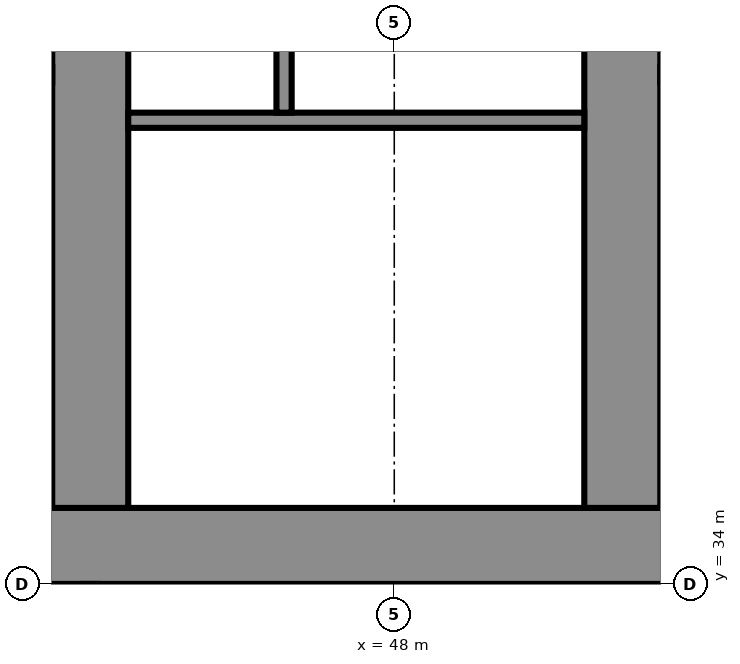
"""IFC4 building model, lengths in metres.
Left out: names, types, materials, properties, quantities, classifications, styles, units other than length and angle.
Written with IfcOpenShell. Run it as: python <this file> out.ifc"""

import sys

from ifc_helpers import new_model, si_unit, direction, frame, frame_2d, origin, place, context, subcontext, project, spatial, rectangle, extrude, element, fill, save


model = new_model("IFC4")
c1 = context("Model", 3, precision=1e-05, world=origin(), true_north=direction((0.0, 1.0)))
c2 = subcontext(c1, "Body", "Model", "MODEL_VIEW")
j1 = project(units=[si_unit("LENGTHUNIT", "METRE"), si_unit("PLANEANGLEUNIT", "RADIAN")], contexts=[c1])
p1 = place(None, origin())
s1 = spatial("IfcSite", under=j1, at=p1, CompositionType="ELEMENT")
p2 = place(p1, origin())
s2 = spatial("IfcBuilding", under=s1, at=p2, CompositionType="ELEMENT")
p3 = place(p2, frame((0.0, 0.0, 96.7)))
s3 = spatial("IfcBuildingStorey", under=s2, at=p3, CompositionType="ELEMENT", Elevation=96.7)
p4 = place(p3, frame((16.0, 34.5, 0.0), z_axis=(0.0, 0.0, 1.0), x_axis=(1.0, 0.0, 0.0)))
e1 = element("IfcWall", 1, at=p4, inside=s3, PredefinedType="SHEAR", context=c2, shape_type="SweptSolid", body=[
    extrude(rectangle(XDim=49.0, YDim=1.0, at=frame_2d((24.5, 0.0))), origin(), (0.0, 0.0, 1.0), 3.6),
])
p5 = place(p4, frame((1.2, 0.0, 0.0)))
e2 = element("IfcOpeningElement", 2, at=p5, cuts=e1, PredefinedType="OPENING", context=c2, shape_type="SweptSolid", body=[
    extrude(rectangle(XDim=1.1, YDim=2.1, at=frame_2d((0.55, 1.05))), frame((0.0, 0.51, 0.0), z_axis=(0.0, -1.0, 0.0), x_axis=(1.0, 0.0, 0.0)), (0.0, 0.0, 1.0), 1.02),
])
p6 = place(p4, frame((5.083, 0.0, 0.0)))
e3 = element("IfcOpeningElement", 3, at=p6, cuts=e1, PredefinedType="OPENING", context=c2, shape_type="SweptSolid", body=[
    extrude(rectangle(XDim=1.1, YDim=2.1, at=frame_2d((0.55, 1.05))), frame((0.0, 0.51, 0.0), z_axis=(0.0, -1.0, 0.0), x_axis=(1.0, 0.0, 0.0)), (0.0, 0.0, 1.0), 1.02),
])
p7 = place(p4, frame((2.933, 0.0, 0.0)))
e4 = element("IfcOpeningElement", 4, at=p7, cuts=e1, PredefinedType="OPENING", context=c2, shape_type="SweptSolid", body=[
    extrude(rectangle(XDim=1.4, YDim=2.1, at=frame_2d((0.7, 1.05))), frame((0.0, 0.51, 0.0), z_axis=(0.0, -1.0, 0.0), x_axis=(1.0, 0.0, 0.0)), (0.0, 0.0, 1.0), 1.02),
])
p8 = place(p4, frame((7.65, 0.0, 0.0)))
e5 = element("IfcOpeningElement", 5, at=p8, cuts=e1, PredefinedType="OPENING", context=c2, shape_type="SweptSolid", body=[
    extrude(rectangle(XDim=1.2, YDim=2.1, at=frame_2d((0.6, 1.05))), frame((0.0, 0.51, 0.0), z_axis=(0.0, -1.0, 0.0), x_axis=(1.0, 0.0, 0.0)), (0.0, 0.0, 1.0), 1.02),
])
p9 = place(p4, frame((14.817, 0.0, 0.0)))
e6 = element("IfcOpeningElement", 6, at=p9, cuts=e1, PredefinedType="OPENING", context=c2, shape_type="SweptSolid", body=[
    extrude(rectangle(XDim=1.1, YDim=2.1, at=frame_2d((0.55, 1.05))), frame((0.0, 0.51, 0.0), z_axis=(0.0, -1.0, 0.0), x_axis=(1.0, 0.0, 0.0)), (0.0, 0.0, 1.0), 1.02),
])
p10 = place(p4, frame((19.083, 0.0, 0.0)))
e7 = element("IfcOpeningElement", 7, at=p10, cuts=e1, PredefinedType="OPENING", context=c2, shape_type="SweptSolid", body=[
    extrude(rectangle(XDim=1.1, YDim=2.1, at=frame_2d((0.55, 1.05))), frame((0.0, 0.51, 0.0), z_axis=(0.0, -1.0, 0.0), x_axis=(1.0, 0.0, 0.0)), (0.0, 0.0, 1.0), 1.02),
])
p11 = place(p4, frame((16.8, 0.0, 0.0)))
e8 = element("IfcOpeningElement", 8, at=p11, cuts=e1, PredefinedType="OPENING", context=c2, shape_type="SweptSolid", body=[
    extrude(rectangle(XDim=1.4, YDim=2.1, at=frame_2d((0.7, 1.05))), frame((0.0, 0.51, 0.0), z_axis=(0.0, -1.0, 0.0), x_axis=(1.0, 0.0, 0.0)), (0.0, 0.0, 1.0), 1.02),
])
p12 = place(p4, frame((21.817, 0.0, 0.0)))
e9 = element("IfcOpeningElement", 9, at=p12, cuts=e1, PredefinedType="OPENING", context=c2, shape_type="SweptSolid", body=[
    extrude(rectangle(XDim=1.1, YDim=2.1, at=frame_2d((0.55, 1.05))), frame((0.0, 0.51, 0.0), z_axis=(0.0, -1.0, 0.0), x_axis=(1.0, 0.0, 0.0)), (0.0, 0.0, 1.0), 1.02),
])
p13 = place(p4, frame((26.083, 0.0, 0.0)))
e10 = element("IfcOpeningElement", 10, at=p13, cuts=e1, PredefinedType="OPENING", context=c2, shape_type="SweptSolid", body=[
    extrude(rectangle(XDim=1.1, YDim=2.1, at=frame_2d((0.55, 1.05))), frame((0.0, 0.51, 0.0), z_axis=(0.0, -1.0, 0.0), x_axis=(1.0, 0.0, 0.0)), (0.0, 0.0, 1.0), 1.02),
])
p14 = place(p4, frame((33.15, 0.0, 0.0)))
e11 = element("IfcOpeningElement", 11, at=p14, cuts=e1, PredefinedType="OPENING", context=c2, shape_type="SweptSolid", body=[
    extrude(rectangle(XDim=1.2, YDim=2.1, at=frame_2d((0.6, 1.05))), frame((0.0, 0.51, 0.0), z_axis=(0.0, -1.0, 0.0), x_axis=(1.0, 0.0, 0.0)), (0.0, 0.0, 1.0), 1.02),
])
p15 = place(p4, frame((37.8, 0.0, 0.0)))
e12 = element("IfcOpeningElement", 12, at=p15, cuts=e1, PredefinedType="OPENING", context=c2, shape_type="SweptSolid", body=[
    extrude(rectangle(XDim=1.4, YDim=2.1, at=frame_2d((0.7, 1.05))), frame((0.0, 0.51, 0.0), z_axis=(0.0, -1.0, 0.0), x_axis=(1.0, 0.0, 0.0)), (0.0, 0.0, 1.0), 1.02),
])
p16 = place(p4, frame((42.817, 0.0, 0.0)))
e13 = element("IfcOpeningElement", 13, at=p16, cuts=e1, PredefinedType="OPENING", context=c2, shape_type="SweptSolid", body=[
    extrude(rectangle(XDim=1.1, YDim=2.1, at=frame_2d((0.55, 1.05))), frame((0.0, 0.51, 0.0), z_axis=(0.0, -1.0, 0.0), x_axis=(1.0, 0.0, 0.0)), (0.0, 0.0, 1.0), 1.02),
])
p17 = place(p4, frame((46.7, 0.0, 0.0)))
e14 = element("IfcOpeningElement", 14, at=p17, cuts=e1, PredefinedType="OPENING", context=c2, shape_type="SweptSolid", body=[
    extrude(rectangle(XDim=1.1, YDim=2.1, at=frame_2d((0.55, 1.05))), frame((0.0, 0.51, 0.0), z_axis=(0.0, -1.0, 0.0), x_axis=(1.0, 0.0, 0.0)), (0.0, 0.0, 1.0), 1.02),
])
p18 = place(p4, frame((44.667, 0.0, 0.0)))
e15 = element("IfcOpeningElement", 15, at=p18, cuts=e1, PredefinedType="OPENING", context=c2, shape_type="SweptSolid", body=[
    extrude(rectangle(XDim=1.4, YDim=2.1, at=frame_2d((0.7, 1.05))), frame((0.0, 0.51, 0.0), z_axis=(0.0, -1.0, 0.0), x_axis=(1.0, 0.0, 0.0)), (0.0, 0.0, 1.0), 1.02),
])
p19 = place(p3, frame((44.0, 35.0, 0.0), z_axis=(0.0, 0.0, 1.0), x_axis=(0.0, 1.0, 0.0)))
e16 = element("IfcWall", 16, at=p19, inside=s3, PredefinedType="SHEAR", context=c2, shape_type="SweptSolid", body=[
    extrude(rectangle(XDim=14.577, YDim=1.0, at=frame_2d((7.289, 0.0))), origin(), (0.0, 0.0, 1.0), 3.6),
])
p20 = place(p19, frame((3.4, 0.0, 0.0)))
e17 = element("IfcOpeningElement", 17, at=p20, cuts=e16, PredefinedType="OPENING", context=c2, shape_type="SweptSolid", body=[
    extrude(rectangle(XDim=1.1, YDim=2.1, at=frame_2d((0.55, 1.05))), frame((0.0, 0.51, 0.0), z_axis=(0.0, -1.0, 0.0), x_axis=(1.0, 0.0, 0.0)), (0.0, 0.0, 1.0), 1.02),
])
p21 = place(p19, frame((9.8, 0.0, 0.0)))
e18 = element("IfcOpeningElement", 18, at=p21, cuts=e16, PredefinedType="OPENING", context=c2, shape_type="SweptSolid", body=[
    extrude(rectangle(XDim=1.0, YDim=2.1, at=frame_2d((0.5, 1.05))), frame((0.0, 0.51, 0.0), z_axis=(0.0, -1.0, 0.0), x_axis=(1.0, 0.0, 0.0)), (0.0, 0.0, 1.0), 1.02),
])
p22 = place(p3, frame((51.0, 35.0, 0.0), z_axis=(0.0, 0.0, 1.0), x_axis=(0.0, 1.0, 0.0)))
e19 = element("IfcWall", 19, at=p22, inside=s3, PredefinedType="SHEAR", context=c2, shape_type="SweptSolid", body=[
    extrude(rectangle(XDim=13.965, YDim=1.0, at=frame_2d((6.982, 0.0))), origin(), (0.0, 0.0, 1.0), 3.6),
])
p23 = place(p22, frame((3.4, 0.0, 0.0)))
e20 = element("IfcOpeningElement", 20, at=p23, cuts=e19, PredefinedType="OPENING", context=c2, shape_type="SweptSolid", body=[
    extrude(rectangle(XDim=1.1, YDim=2.1, at=frame_2d((0.55, 1.05))), frame((0.0, 0.51, 0.0), z_axis=(0.0, -1.0, 0.0), x_axis=(1.0, 0.0, 0.0)), (0.0, 0.0, 1.0), 1.02),
])
p24 = place(p3, frame((44.5, 40.1, 0.0), z_axis=(0.0, 0.0, 1.0), x_axis=(1.0, 0.0, 0.0)))
e21 = element("IfcWall", 21, at=p24, inside=s3, PredefinedType="SHEAR", context=c2, shape_type="SweptSolid", body=[
    extrude(rectangle(XDim=6.0, YDim=0.2, at=frame_2d((3.0, 0.0))), origin(), (0.0, 0.0, 1.0), 3.2),
])
p25 = place(p24, frame((3.425, 0.0, 0.0)))
e22 = element("IfcOpeningElement", 22, at=p25, cuts=e21, PredefinedType="OPENING", context=c2, shape_type="SweptSolid", body=[
    extrude(rectangle(XDim=1.2, YDim=2.1, at=frame_2d((0.6, 1.05))), frame((0.0, 0.11, 0.0), z_axis=(0.0, -1.0, 0.0), x_axis=(1.0, 0.0, 0.0)), (0.0, 0.0, 1.0), 0.22),
])
p26 = place(p24, frame((0.525, 0.0, 0.0)))
e23 = element("IfcOpeningElement", 23, at=p26, cuts=e21, PredefinedType="OPENING", context=c2, shape_type="SweptSolid", body=[
    extrude(rectangle(XDim=0.9, YDim=2.1, at=frame_2d((0.45, 1.05))), frame((0.0, 0.11, 0.0), z_axis=(0.0, -1.0, 0.0), x_axis=(1.0, 0.0, 0.0)), (0.0, 0.0, 1.0), 0.22),
])
p27 = place(p3, frame((46.55, 40.2, 0.0), z_axis=(0.0, 0.0, 1.0), x_axis=(0.0, 1.0, 0.0)))
e24 = element("IfcWall", 24, at=p27, inside=s3, PredefinedType="SHEAR", context=c2, shape_type="SweptSolid", body=[
    extrude(rectangle(XDim=7.2, YDim=0.2, at=frame_2d((3.6, 0.0))), origin(), (0.0, 0.0, 1.0), 3.2),
])
p28 = place(p25, origin())
e25 = element("IfcDoor", 25, at=p28, inside=s3, OperationType="SINGLE_SWING_RIGHT", PredefinedType="DOOR", context=c2, shape_type="SweptSolid", body=[
    extrude(rectangle(XDim=1.2, YDim=2.1, at=frame_2d((0.6, 1.05))), frame((0.0, 0.025, 0.0), z_axis=(0.0, -1.0, 0.0), x_axis=(1.0, 0.0, 0.0)), (0.0, 0.0, 1.0), 0.05),
])
fill(e22, e25)
p29 = place(p26, origin())
e26 = element("IfcDoor", 26, at=p29, inside=s3, OperationType="SINGLE_SWING_LEFT", PredefinedType="DOOR", context=c2, shape_type="SweptSolid", body=[
    extrude(rectangle(XDim=0.9, YDim=2.1, at=frame_2d((0.45, 1.05))), frame((0.0, 0.025, 0.0), z_axis=(0.0, -1.0, 0.0), x_axis=(1.0, 0.0, 0.0)), (0.0, 0.0, 1.0), 0.05),
])
fill(e23, e26)
p30 = place(p14, origin())
e27 = element("IfcDoor", 27, at=p30, inside=s3, OperationType="SINGLE_SWING_LEFT", PredefinedType="DOOR", context=c2, shape_type="SweptSolid", body=[
    extrude(rectangle(XDim=1.2, YDim=2.1, at=frame_2d((0.6, 1.05))), frame((0.0, 0.025, 0.0), z_axis=(0.0, -1.0, 0.0), x_axis=(1.0, 0.0, 0.0)), (0.0, 0.0, 1.0), 0.05),
])
fill(e11, e27)
p31 = place(p20, origin())
e28 = element("IfcDoor", 28, at=p31, inside=s3, OperationType="SINGLE_SWING_LEFT", PredefinedType="DOOR", context=c2, shape_type="SweptSolid", body=[
    extrude(rectangle(XDim=1.1, YDim=2.1, at=frame_2d((0.55, 1.05))), frame((0.0, 0.025, 0.0), z_axis=(0.0, -1.0, 0.0), x_axis=(1.0, 0.0, 0.0)), (0.0, 0.0, 1.0), 0.05),
])
fill(e17, e28)
p32 = place(p23, origin())
e29 = element("IfcDoor", 29, at=p32, inside=s3, OperationType="SINGLE_SWING_RIGHT", PredefinedType="DOOR", context=c2, shape_type="SweptSolid", body=[
    extrude(rectangle(XDim=1.1, YDim=2.1, at=frame_2d((0.55, 1.05))), frame((0.0, 0.025, 0.0), z_axis=(0.0, -1.0, 0.0), x_axis=(1.0, 0.0, 0.0)), (0.0, 0.0, 1.0), 0.05),
])
fill(e20, e29)
save(model, sys.argv[1])
